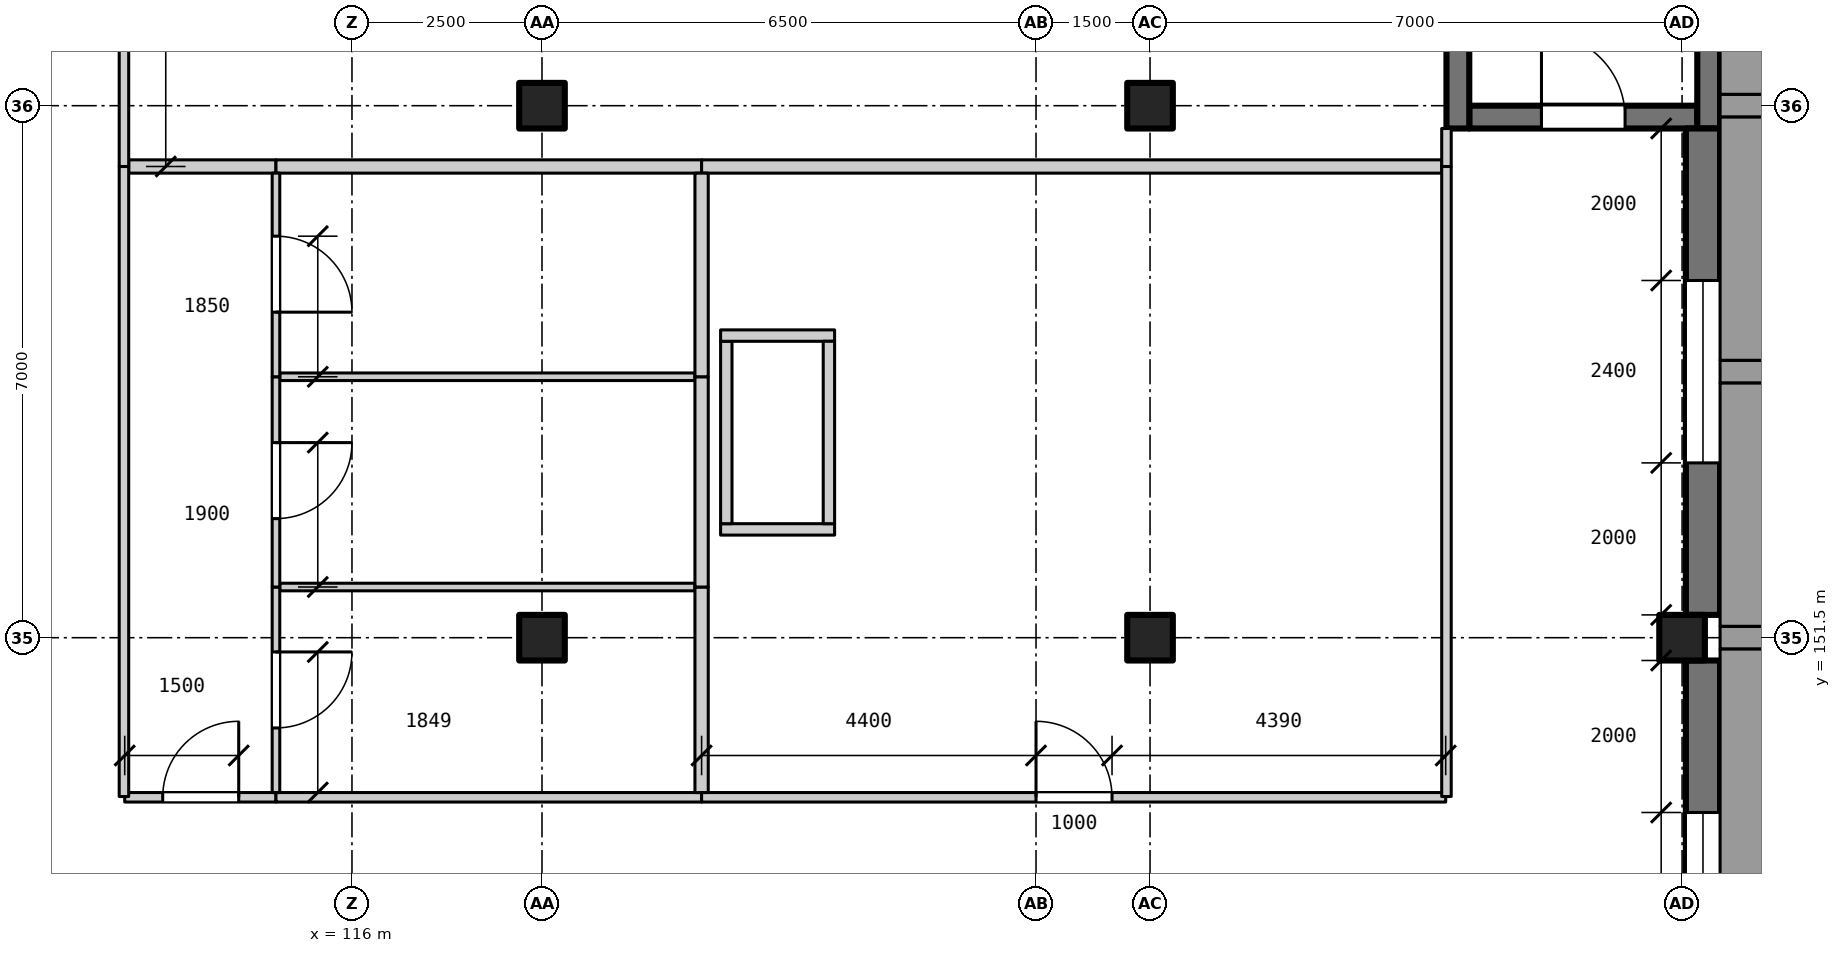
"""IFC4 building model, lengths in metres.
Left out: names, types, materials, properties, quantities, classifications, styles, units other than length and angle.
Written with IfcOpenShell. Run it as: python <this file> out.ifc"""

import sys

from ifc_helpers import new_model, si_unit, direction, frame, frame_2d, origin, origin_2d, place, context, subcontext, project, spatial, rectangle, extrude, element, fill, save


model = new_model("IFC4")
c1 = context("Model", 3, precision=1e-05, world=origin(), true_north=direction((0.0, 1.0)))
c2 = subcontext(c1, "Body", "Model", "MODEL_VIEW")
j1 = project(units=[si_unit("LENGTHUNIT", "METRE"), si_unit("PLANEANGLEUNIT", "RADIAN")], contexts=[c1])
p1 = place(None, origin())
s1 = spatial("IfcSite", under=j1, at=p1, CompositionType="ELEMENT")
p2 = place(p1, origin())
s2 = spatial("IfcBuilding", under=s1, at=p2, CompositionType="ELEMENT")
p3 = place(p2, frame((0.0, 0.0, 14.4)))
s3 = spatial("IfcBuildingStorey", under=s2, at=p3, CompositionType="ELEMENT", Elevation=14.4)
for number, where, z_axis, x_axis in (
    (1, (118.5, 151.5, 0.0), (0.0, 0.0, 1.0), (1.0, 0.0, 0.0)),
    (2, (118.5, 158.5, 0.0), (0.0, 0.0, 1.0), (1.0, 0.0, 0.0)),
    (3, (126.5, 151.5, 0.0), (0.0, 0.0, 1.0), (1.0, 0.0, 0.0)),
    (4, (126.5, 158.5, 0.0), (0.0, 0.0, 1.0), (1.0, 0.0, 0.0)),
    (5, (133.5, 151.5, 0.0), (0.0, 0.0, 1.0), (1.0, 0.0, 0.0)),
):
    element("IfcColumn", number, at=place(p3, frame(where, z_axis=z_axis, x_axis=x_axis)), inside=s3, PredefinedType="COLUMN", context=c2, shape_type="SweptSolid", body=[
        extrude(rectangle(XDim=0.6, YDim=0.6, at=origin_2d()), origin(), (0.0, 0.0, 1.0), 3.9),
    ])
p4 = place(p3, frame((130.7, 158.35, 0.0), z_axis=(0.0, 0.0, 1.0), x_axis=(1.0, 0.0, 0.0)))
e6 = element("IfcWall", 6, at=p4, inside=s3, PredefinedType="SHEAR", context=c2, shape_type="SweptSolid", body=[
    extrude(rectangle(XDim=3.0, YDim=0.3, at=frame_2d((1.5, 0.0))), origin(), (0.0, 0.0, 1.0), 3.9),
])
p5 = place(p4, frame((0.95, 0.0, 0.0)))
e7 = element("IfcOpeningElement", 7, at=p5, cuts=e6, PredefinedType="OPENING", context=c2, shape_type="SweptSolid", body=[
    extrude(rectangle(XDim=1.1, YDim=2.1, at=frame_2d((0.55, 1.05))), frame((0.0, 0.16, 0.0), z_axis=(0.0, -1.0, 0.0), x_axis=(1.0, 0.0, 0.0)), (0.0, 0.0, 1.0), 0.32),
])
p6 = place(p3, frame((130.55, 158.2, 0.0), z_axis=(0.0, 0.0, 1.0), x_axis=(0.0, 1.0, 0.0)))
e8 = element("IfcWall", 8, at=p6, inside=s3, PredefinedType="SHEAR", context=c2, shape_type="SweptSolid", body=[
    extrude(rectangle(XDim=7.5, YDim=0.3, at=frame_2d((3.75, 0.0))), origin(), (0.0, 0.0, 1.0), 3.9),
])
p7 = place(p3, frame((133.875, 165.75, 4.2), z_axis=(0.0, 0.0, 1.0), x_axis=(0.0, -1.0, 0.0)))
e9 = element("IfcWall", 9, at=p7, inside=s3, PredefinedType="PARAPET", context=c2, shape_type="SweptSolid", body=[
    extrude(rectangle(XDim=35.5, YDim=0.25, at=frame_2d((17.75, 0.0))), origin(), (0.0, 0.0, 1.0), 1.1),
])
p8 = place(p3, frame((133.85, 165.7, 0.0), z_axis=(0.0, 0.0, 1.0), x_axis=(0.0, -1.0, 0.0)))
e10 = element("IfcWall", 10, at=p8, inside=s3, PredefinedType="SOLIDWALL", context=c2, shape_type="SweptSolid", body=[
    extrude(rectangle(XDim=7.5, YDim=0.3, at=frame_2d((3.75, 0.0))), origin(), (0.0, 0.0, 1.0), 3.9),
])
p9 = place(p3, frame((133.775, 151.2, 0.0), z_axis=(0.0, 0.0, 1.0), x_axis=(0.0, -1.0, 0.0)))
e11 = element("IfcWall", 11, at=p9, inside=s3, PredefinedType="SOLIDWALL", context=c2, shape_type="SweptSolid", body=[
    extrude(rectangle(XDim=6.4, YDim=0.45, at=frame_2d((3.2, 0.0))), origin(), (0.0, 0.0, 1.0), 3.1),
])
p10 = place(p9, frame((2.0, 0.0, 0.9)))
e12 = element("IfcOpeningElement", 12, at=p10, cuts=e11, PredefinedType="OPENING", context=c2, shape_type="SweptSolid", body=[
    extrude(rectangle(XDim=2.4, YDim=1.6, at=frame_2d((1.2, 0.8))), frame((0.0, 0.235, 0.0), z_axis=(0.0, -1.0, 0.0), x_axis=(1.0, 0.0, 0.0)), (0.0, 0.0, 1.0), 0.47),
])
p11 = place(p3, frame((133.775, 158.2, 0.0), z_axis=(0.0, 0.0, 1.0), x_axis=(0.0, -1.0, 0.0)))
e13 = element("IfcWall", 13, at=p11, inside=s3, PredefinedType="SOLIDWALL", context=c2, shape_type="SweptSolid", body=[
    extrude(rectangle(XDim=6.4, YDim=0.45, at=frame_2d((3.2, 0.0))), origin(), (0.0, 0.0, 1.0), 3.1),
])
p12 = place(p11, frame((2.0, 0.0, 0.9)))
e14 = element("IfcOpeningElement", 14, at=p12, cuts=e13, PredefinedType="OPENING", context=c2, shape_type="SweptSolid", body=[
    extrude(rectangle(XDim=2.4, YDim=1.6, at=frame_2d((1.2, 0.8))), frame((0.0, 0.235, 0.0), z_axis=(0.0, -1.0, 0.0), x_axis=(1.0, 0.0, 0.0)), (0.0, 0.0, 1.0), 0.47),
])
p13 = place(p3, frame((120.85, 152.925, 0.0), z_axis=(0.0, 0.0, 1.0), x_axis=(1.0, 0.0, 0.0)))
e15 = element("IfcWall", 15, at=p13, inside=s3, PredefinedType="PARTITIONING", context=c2, shape_type="SweptSolid", body=[
    extrude(rectangle(XDim=1.5, YDim=0.15, at=frame_2d((0.75, 0.0))), origin(), (0.0, 0.0, 1.0), 3.9),
])
p14 = place(p3, frame((120.925, 153.0, 0.0), z_axis=(0.0, 0.0, 1.0), x_axis=(0.0, 1.0, 0.0)))
e16 = element("IfcWall", 16, at=p14, inside=s3, PredefinedType="PARTITIONING", context=c2, shape_type="SweptSolid", body=[
    extrude(rectangle(XDim=2.4, YDim=0.15, at=frame_2d((1.2, 0.0))), origin(), (0.0, 0.0, 1.0), 3.9),
])
p15 = place(p3, frame((120.85, 155.475, 0.0), z_axis=(0.0, 0.0, 1.0), x_axis=(1.0, 0.0, 0.0)))
e17 = element("IfcWall", 17, at=p15, inside=s3, PredefinedType="PARTITIONING", context=c2, shape_type="SweptSolid", body=[
    extrude(rectangle(XDim=1.5, YDim=0.15, at=frame_2d((0.75, 0.0))), origin(), (0.0, 0.0, 1.0), 3.9),
])
p16 = place(p3, frame((122.275, 153.0, 0.0), z_axis=(0.0, 0.0, 1.0), x_axis=(0.0, 1.0, 0.0)))
e18 = element("IfcWall", 18, at=p16, inside=s3, PredefinedType="PARTITIONING", context=c2, shape_type="SweptSolid", body=[
    extrude(rectangle(XDim=2.4, YDim=0.15, at=frame_2d((1.2, 0.0))), origin(), (0.0, 0.0, 1.0), 3.9),
])
p17 = place(p3, frame((113.01, 149.4, 0.0), z_axis=(0.0, 0.0, 1.0), x_axis=(1.0, 0.0, 0.0)))
e19 = element("IfcWall", 19, at=p17, inside=s3, PredefinedType="PARTITIONING", context=c2, shape_type="SweptSolid", body=[
    extrude(rectangle(XDim=1.99, YDim=0.125, at=frame_2d((0.995, 0.0))), origin(), (0.0, 0.0, 1.0), 3.9),
])
p18 = place(p17, frame((0.5, 0.0, 0.0)))
e20 = element("IfcOpeningElement", 20, at=p18, cuts=e19, PredefinedType="OPENING", context=c2, shape_type="SweptSolid", body=[
    extrude(rectangle(XDim=1.0, YDim=2.1, at=frame_2d((0.5, 1.05))), frame((0.0, 0.073, 0.0), z_axis=(0.0, -1.0, 0.0), x_axis=(1.0, 0.0, 0.0)), (0.0, 0.0, 1.0), 0.145),
])
p19 = place(p3, frame((115.0, 149.4, 0.0), z_axis=(0.0, 0.0, 1.0), x_axis=(1.0, 0.0, 0.0)))
e21 = element("IfcWall", 21, at=p19, inside=s3, PredefinedType="PARTITIONING", context=c2, shape_type="SweptSolid", body=[
    extrude(rectangle(XDim=5.6, YDim=0.125, at=frame_2d((2.8, 0.0))), origin(), (0.0, 0.0, 1.0), 3.9),
])
p20 = place(p3, frame((120.6, 149.4, 0.0), z_axis=(0.0, 0.0, 1.0), x_axis=(1.0, 0.0, 0.0)))
e22 = element("IfcWall", 22, at=p20, inside=s3, PredefinedType="PARTITIONING", context=c2, shape_type="SweptSolid", body=[
    extrude(rectangle(XDim=9.79, YDim=0.125, at=frame_2d((4.895, 0.0))), origin(), (0.0, 0.0, 1.0), 3.9),
])
p21 = place(p20, frame((4.4, 0.0, 0.0)))
e23 = element("IfcOpeningElement", 23, at=p21, cuts=e22, PredefinedType="OPENING", context=c2, shape_type="SweptSolid", body=[
    extrude(rectangle(XDim=1.0, YDim=2.1, at=frame_2d((0.5, 1.05))), frame((0.0, 0.073, 0.0), z_axis=(0.0, -1.0, 0.0), x_axis=(1.0, 0.0, 0.0)), (0.0, 0.0, 1.0), 0.145),
])
for number, where, z_axis, x_axis in (
    (24, (115.05, 152.167, 0.0), (0.0, 0.0, 1.0), (1.0, 0.0, 0.0)),
    (25, (115.05, 154.933, 0.0), (0.0, 0.0, 1.0), (1.0, 0.0, 0.0)),
):
    element("IfcWall", number, at=place(p3, frame(where, z_axis=z_axis, x_axis=x_axis)), inside=s3, PredefinedType="PARTITIONING", context=c2, shape_type="SweptSolid", body=[
        extrude(rectangle(XDim=5.462, YDim=0.1, at=frame_2d((2.731, 0.0))), origin(), (0.0, 0.0, 1.0), 3.9),
    ])
p22 = place(p3, frame((113.062, 157.7, 0.0), z_axis=(0.0, 0.0, 1.0), x_axis=(1.0, 0.0, 0.0)))
e26 = element("IfcWall", 26, at=p22, inside=s3, PredefinedType="PARTITIONING", context=c2, shape_type="SweptSolid", body=[
    extrude(rectangle(XDim=1.938, YDim=0.175, at=frame_2d((0.969, 0.0))), origin(), (0.0, 0.0, 1.0), 3.9),
])
p23 = place(p3, frame((115.0, 157.7, 0.0), z_axis=(0.0, 0.0, 1.0), x_axis=(1.0, 0.0, 0.0)))
e27 = element("IfcWall", 27, at=p23, inside=s3, PredefinedType="PARTITIONING", context=c2, shape_type="SweptSolid", body=[
    extrude(rectangle(XDim=5.6, YDim=0.175, at=frame_2d((2.8, 0.0))), origin(), (0.0, 0.0, 1.0), 3.9),
])
p24 = place(p3, frame((120.6, 157.7, 0.0), z_axis=(0.0, 0.0, 1.0), x_axis=(1.0, 0.0, 0.0)))
e28 = element("IfcWall", 28, at=p24, inside=s3, PredefinedType="PARTITIONING", context=c2, shape_type="SweptSolid", body=[
    extrude(rectangle(XDim=9.737, YDim=0.175, at=frame_2d((4.869, 0.0))), origin(), (0.0, 0.0, 1.0), 3.9),
])
p25 = place(p3, frame((113.0, 149.41, 0.0), z_axis=(0.0, 0.0, 1.0), x_axis=(0.0, 1.0, 0.0)))
e29 = element("IfcWall", 29, at=p25, inside=s3, PredefinedType="PARTITIONING", context=c2, shape_type="SweptSolid", body=[
    extrude(rectangle(XDim=8.29, YDim=0.125, at=frame_2d((4.145, 0.0))), origin(), (0.0, 0.0, 1.0), 3.9),
])
p26 = place(p3, frame((113.0, 157.7, 0.0), z_axis=(0.0, 0.0, 1.0), x_axis=(0.0, 1.0, 0.0)))
e30 = element("IfcWall", 30, at=p26, inside=s3, PredefinedType="PARTITIONING", context=c2, shape_type="SweptSolid", body=[
    extrude(rectangle(XDim=8.05, YDim=0.125, at=frame_2d((4.025, 0.0))), origin(), (0.0, 0.0, 1.0), 3.9),
])
p27 = place(p26, frame((3.55, 0.0, 0.0)))
e31 = element("IfcOpeningElement", 31, at=p27, cuts=e30, PredefinedType="OPENING", context=c2, shape_type="SweptSolid", body=[
    extrude(rectangle(XDim=1.0, YDim=2.1, at=frame_2d((0.5, 1.05))), frame((0.0, 0.073, 0.0), z_axis=(0.0, -1.0, 0.0), x_axis=(1.0, 0.0, 0.0)), (0.0, 0.0, 1.0), 0.145),
])
p28 = place(p3, frame((115.0, 149.462, 0.0), z_axis=(0.0, 0.0, 1.0), x_axis=(0.0, 1.0, 0.0)))
e32 = element("IfcWall", 32, at=p28, inside=s3, PredefinedType="PARTITIONING", context=c2, shape_type="SweptSolid", body=[
    extrude(rectangle(XDim=2.704, YDim=0.1, at=frame_2d((1.352, 0.0))), origin(), (0.0, 0.0, 1.0), 3.9),
])
p29 = place(p28, frame((0.85, 0.0, 0.0)))
e33 = element("IfcOpeningElement", 33, at=p29, cuts=e32, PredefinedType="OPENING", context=c2, shape_type="SweptSolid", body=[
    extrude(rectangle(XDim=1.0, YDim=2.1, at=frame_2d((0.5, 1.05))), frame((0.0, 0.06, 0.0), z_axis=(0.0, -1.0, 0.0), x_axis=(1.0, 0.0, 0.0)), (0.0, 0.0, 1.0), 0.12),
])
p30 = place(p3, frame((115.0, 152.167, 0.0), z_axis=(0.0, 0.0, 1.0), x_axis=(0.0, 1.0, 0.0)))
e34 = element("IfcWall", 34, at=p30, inside=s3, PredefinedType="PARTITIONING", context=c2, shape_type="SweptSolid", body=[
    extrude(rectangle(XDim=2.767, YDim=0.1, at=frame_2d((1.383, 0.0))), origin(), (0.0, 0.0, 1.0), 3.9),
])
p31 = place(p30, frame((0.9, 0.0, 0.0)))
e35 = element("IfcOpeningElement", 35, at=p31, cuts=e34, PredefinedType="OPENING", context=c2, shape_type="SweptSolid", body=[
    extrude(rectangle(XDim=1.0, YDim=2.1, at=frame_2d((0.5, 1.05))), frame((0.0, 0.06, 0.0), z_axis=(0.0, -1.0, 0.0), x_axis=(1.0, 0.0, 0.0)), (0.0, 0.0, 1.0), 0.12),
])
p32 = place(p3, frame((115.0, 154.933, 0.0), z_axis=(0.0, 0.0, 1.0), x_axis=(0.0, 1.0, 0.0)))
e36 = element("IfcWall", 36, at=p32, inside=s3, PredefinedType="PARTITIONING", context=c2, shape_type="SweptSolid", body=[
    extrude(rectangle(XDim=2.679, YDim=0.1, at=frame_2d((1.34, 0.0))), origin(), (0.0, 0.0, 1.0), 3.9),
])
p33 = place(p32, frame((0.85, 0.0, 0.0)))
e37 = element("IfcOpeningElement", 37, at=p33, cuts=e36, PredefinedType="OPENING", context=c2, shape_type="SweptSolid", body=[
    extrude(rectangle(XDim=1.0, YDim=2.1, at=frame_2d((0.5, 1.05))), frame((0.0, 0.06, 0.0), z_axis=(0.0, -1.0, 0.0), x_axis=(1.0, 0.0, 0.0)), (0.0, 0.0, 1.0), 0.12),
])
p34 = place(p3, frame((120.6, 149.462, 0.0), z_axis=(0.0, 0.0, 1.0), x_axis=(0.0, 1.0, 0.0)))
e38 = element("IfcWall", 38, at=p34, inside=s3, PredefinedType="PARTITIONING", context=c2, shape_type="SweptSolid", body=[
    extrude(rectangle(XDim=2.704, YDim=0.175, at=frame_2d((1.352, 0.0))), origin(), (0.0, 0.0, 1.0), 3.9),
])
p35 = place(p3, frame((120.6, 152.167, 0.0), z_axis=(0.0, 0.0, 1.0), x_axis=(0.0, 1.0, 0.0)))
e39 = element("IfcWall", 39, at=p35, inside=s3, PredefinedType="PARTITIONING", context=c2, shape_type="SweptSolid", body=[
    extrude(rectangle(XDim=2.767, YDim=0.175, at=frame_2d((1.383, 0.0))), origin(), (0.0, 0.0, 1.0), 3.9),
])
p36 = place(p3, frame((120.6, 154.933, 0.0), z_axis=(0.0, 0.0, 1.0), x_axis=(0.0, 1.0, 0.0)))
e40 = element("IfcWall", 40, at=p36, inside=s3, PredefinedType="PARTITIONING", context=c2, shape_type="SweptSolid", body=[
    extrude(rectangle(XDim=2.679, YDim=0.175, at=frame_2d((1.34, 0.0))), origin(), (0.0, 0.0, 1.0), 3.9),
])
p37 = place(p3, frame((130.4, 149.41, 0.0), z_axis=(0.0, 0.0, 1.0), x_axis=(0.0, 1.0, 0.0)))
e41 = element("IfcWall", 41, at=p37, inside=s3, PredefinedType="PARTITIONING", context=c2, shape_type="SweptSolid", body=[
    extrude(rectangle(XDim=8.29, YDim=0.125, at=frame_2d((4.145, 0.0))), origin(), (0.0, 0.0, 1.0), 3.9),
])
p38 = place(p3, frame((130.4, 157.7, 0.0), z_axis=(0.0, 0.0, 1.0), x_axis=(0.0, 1.0, 0.0)))
e42 = element("IfcWall", 42, at=p38, inside=s3, PredefinedType="PARTITIONING", context=c2, shape_type="SweptSolid", body=[
    extrude(rectangle(XDim=0.5, YDim=0.125, at=frame_2d((0.25, 0.0))), origin(), (0.0, 0.0, 1.0), 3.9),
])
p39 = place(p10, origin())
e43 = element("IfcWindow", 43, at=p39, inside=s3, PartitioningType="SINGLE_PANEL", PredefinedType="WINDOW", context=c2, shape_type="SweptSolid", body=[
    extrude(rectangle(XDim=2.4, YDim=1.6, at=frame_2d((1.2, 0.8))), frame((0.0, -0.125, 0.0), z_axis=(0.0, -1.0, 0.0), x_axis=(1.0, 0.0, 0.0)), (0.0, 0.0, 1.0), 0.06),
])
fill(e12, e43)
p40 = place(p12, origin())
e44 = element("IfcWindow", 44, at=p40, inside=s3, PartitioningType="SINGLE_PANEL", PredefinedType="WINDOW", context=c2, shape_type="SweptSolid", body=[
    extrude(rectangle(XDim=2.4, YDim=1.6, at=frame_2d((1.2, 0.8))), frame((0.0, -0.125, 0.0), z_axis=(0.0, -1.0, 0.0), x_axis=(1.0, 0.0, 0.0)), (0.0, 0.0, 1.0), 0.06),
])
fill(e14, e44)
p41 = place(p18, origin())
e45 = element("IfcDoor", 45, at=p41, inside=s3, OperationType="SINGLE_SWING_RIGHT", PredefinedType="DOOR", context=c2, shape_type="SweptSolid", body=[
    extrude(rectangle(XDim=1.0, YDim=2.1, at=frame_2d((0.5, 1.05))), frame((0.0, 0.025, 0.0), z_axis=(0.0, -1.0, 0.0), x_axis=(1.0, 0.0, 0.0)), (0.0, 0.0, 1.0), 0.05),
])
fill(e20, e45)
p42 = place(p21, origin())
e46 = element("IfcDoor", 46, at=p42, inside=s3, OperationType="SINGLE_SWING_LEFT", PredefinedType="DOOR", context=c2, shape_type="SweptSolid", body=[
    extrude(rectangle(XDim=1.0, YDim=2.1, at=frame_2d((0.5, 1.05))), frame((0.0, 0.025, 0.0), z_axis=(0.0, -1.0, 0.0), x_axis=(1.0, 0.0, 0.0)), (0.0, 0.0, 1.0), 0.05),
])
fill(e23, e46)
p43 = place(p29, frame((1.0, 0.0, 0.0), z_axis=(0.0, 0.0, 1.0), x_axis=(-1.0, 0.0, 0.0)))
e47 = element("IfcDoor", 47, at=p43, inside=s3, OperationType="SINGLE_SWING_LEFT", PredefinedType="DOOR", context=c2, shape_type="SweptSolid", body=[
    extrude(rectangle(XDim=1.0, YDim=2.1, at=frame_2d((0.5, 1.05))), frame((0.0, 0.025, 0.0), z_axis=(0.0, -1.0, 0.0), x_axis=(1.0, 0.0, 0.0)), (0.0, 0.0, 1.0), 0.05),
])
fill(e33, e47)
p44 = place(p31, frame((1.0, 0.0, 0.0), z_axis=(0.0, 0.0, 1.0), x_axis=(-1.0, 0.0, 0.0)))
e48 = element("IfcDoor", 48, at=p44, inside=s3, OperationType="SINGLE_SWING_LEFT", PredefinedType="DOOR", context=c2, shape_type="SweptSolid", body=[
    extrude(rectangle(XDim=1.0, YDim=2.1, at=frame_2d((0.5, 1.05))), frame((0.0, 0.025, 0.0), z_axis=(0.0, -1.0, 0.0), x_axis=(1.0, 0.0, 0.0)), (0.0, 0.0, 1.0), 0.05),
])
fill(e35, e48)
p45 = place(p33, frame((1.0, 0.0, 0.0), z_axis=(0.0, 0.0, 1.0), x_axis=(-1.0, 0.0, 0.0)))
e49 = element("IfcDoor", 49, at=p45, inside=s3, OperationType="SINGLE_SWING_RIGHT", PredefinedType="DOOR", context=c2, shape_type="SweptSolid", body=[
    extrude(rectangle(XDim=1.0, YDim=2.1, at=frame_2d((0.5, 1.05))), frame((0.0, 0.025, 0.0), z_axis=(0.0, -1.0, 0.0), x_axis=(1.0, 0.0, 0.0)), (0.0, 0.0, 1.0), 0.05),
])
fill(e37, e49)
p46 = place(p5, origin())
e50 = element("IfcDoor", 50, at=p46, inside=s3, OperationType="SINGLE_SWING_LEFT", PredefinedType="DOOR", context=c2, shape_type="SweptSolid", body=[
    extrude(rectangle(XDim=1.1, YDim=2.1, at=frame_2d((0.55, 1.05))), frame((0.0, 0.025, 0.0), z_axis=(0.0, -1.0, 0.0), x_axis=(1.0, 0.0, 0.0)), (0.0, 0.0, 1.0), 0.05),
])
fill(e7, e50)
save(model, sys.argv[1])
